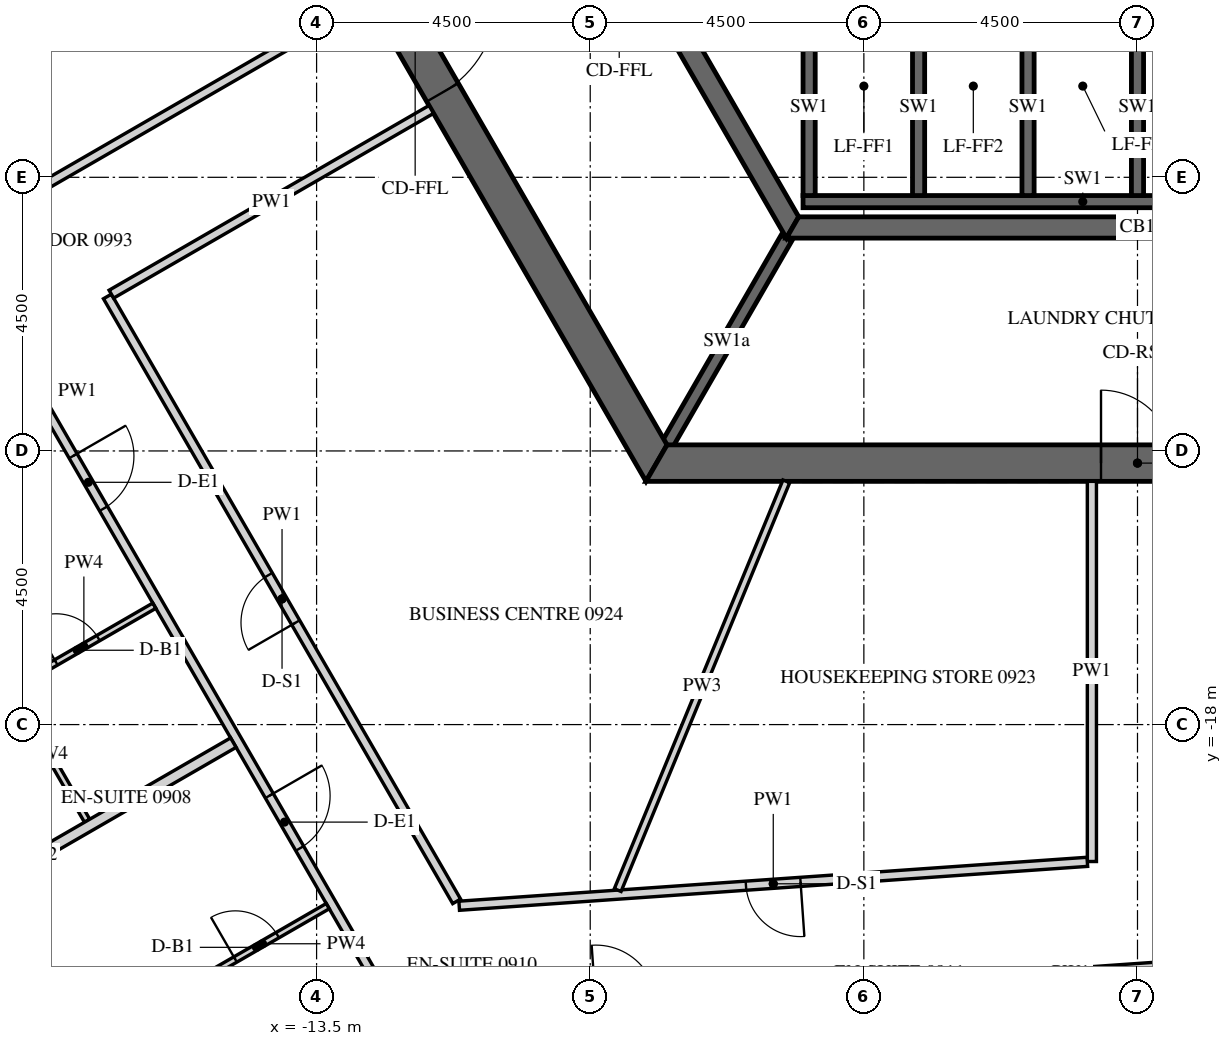
"""IFC4 building model, lengths in metres.
Left out: names, types, materials, properties, quantities, classifications, styles, units other than length and angle.
Written with IfcOpenShell. Run it as: python <this file> out.ifc"""

import sys

from ifc_helpers import new_model, si_unit, direction, frame, frame_2d, origin, place, context, subcontext, project, spatial, polyline, rectangle, outline, extrude, element, fill, save


model = new_model("IFC4")
c1 = context("Model", 3, precision=1e-05, world=origin(), true_north=direction((0.0, 1.0)))
c2 = subcontext(c1, "Body", "Model", "MODEL_VIEW")
j1 = project(units=[si_unit("LENGTHUNIT", "METRE"), si_unit("PLANEANGLEUNIT", "RADIAN")], contexts=[c1])
p1 = place(None, origin())
s1 = spatial("IfcSite", under=j1, at=p1, CompositionType="ELEMENT")
p2 = place(p1, origin())
s2 = spatial("IfcBuilding", under=s1, at=p2, CompositionType="ELEMENT")
p3 = place(p2, frame((0.0, 0.0, 123.3)))
s3 = spatial("IfcBuildingStorey", under=s2, at=p3, CompositionType="ELEMENT", Elevation=123.3)
p4 = place(p3, frame((-32.655, -2.89, -0.15), z_axis=(0.0, 0.0, 1.0), x_axis=(0.499997711317, -0.866026725152, 0.0)))
e1 = element("IfcWall", 1, at=p4, inside=s3, PredefinedType="SOLIDWALL", context=c2, shape_type="SweptSolid", body=[
    extrude(outline(polyline([(-0.022, -0.275), (30.097, -0.275), (30.045, 0.275), (0.022, 0.275), (-0.022, -0.275)])), origin(), (0.0, 0.0, 1.0), 3.9),
])
p5 = place(p4, frame((1.236, 0.0, 1.05)))
e2 = element("IfcOpeningElement", 2, at=p5, cuts=e1, PredefinedType="OPENING", context=c2, shape_type="SweptSolid", body=[
    extrude(rectangle(XDim=2.4, YDim=2.4, at=frame_2d((1.2, 1.2))), frame((0.0, 0.285, 0.0), z_axis=(0.0, -1.0, 0.0), x_axis=(1.0, 0.0, 0.0)), (0.0, 0.0, 1.0), 0.57),
])
p6 = place(p4, frame((4.835, 0.0, 1.05)))
e3 = element("IfcOpeningElement", 3, at=p6, cuts=e1, PredefinedType="OPENING", context=c2, shape_type="SweptSolid", body=[
    extrude(rectangle(XDim=2.4, YDim=2.4, at=frame_2d((1.2, 1.2))), frame((0.0, 0.285, 0.0), z_axis=(0.0, -1.0, 0.0), x_axis=(1.0, 0.0, 0.0)), (0.0, 0.0, 1.0), 0.57),
])
p7 = place(p4, frame((8.436, 0.0, 1.05)))
e4 = element("IfcOpeningElement", 4, at=p7, cuts=e1, PredefinedType="OPENING", context=c2, shape_type="SweptSolid", body=[
    extrude(rectangle(XDim=2.4, YDim=2.4, at=frame_2d((1.2, 1.2))), frame((0.0, 0.285, 0.0), z_axis=(0.0, -1.0, 0.0), x_axis=(1.0, 0.0, 0.0)), (0.0, 0.0, 1.0), 0.57),
])
p8 = place(p4, frame((12.035, 0.0, 1.05)))
e5 = element("IfcOpeningElement", 5, at=p8, cuts=e1, PredefinedType="OPENING", context=c2, shape_type="SweptSolid", body=[
    extrude(rectangle(XDim=2.4, YDim=2.4, at=frame_2d((1.2, 1.2))), frame((0.0, 0.285, 0.0), z_axis=(0.0, -1.0, 0.0), x_axis=(1.0, 0.0, 0.0)), (0.0, 0.0, 1.0), 0.57),
])
p9 = place(p4, frame((15.635, 0.0, 1.05)))
e6 = element("IfcOpeningElement", 6, at=p9, cuts=e1, PredefinedType="OPENING", context=c2, shape_type="SweptSolid", body=[
    extrude(rectangle(XDim=2.4, YDim=2.4, at=frame_2d((1.2, 1.2))), frame((0.0, 0.285, 0.0), z_axis=(0.0, -1.0, 0.0), x_axis=(1.0, 0.0, 0.0)), (0.0, 0.0, 1.0), 0.57),
])
p10 = place(p4, frame((19.236, 0.0, 1.05)))
e7 = element("IfcOpeningElement", 7, at=p10, cuts=e1, PredefinedType="OPENING", context=c2, shape_type="SweptSolid", body=[
    extrude(rectangle(XDim=2.4, YDim=2.4, at=frame_2d((1.2, 1.2))), frame((0.0, 0.285, 0.0), z_axis=(0.0, -1.0, 0.0), x_axis=(1.0, 0.0, 0.0)), (0.0, 0.0, 1.0), 0.57),
])
p11 = place(p4, frame((22.835, 0.0, 1.05)))
e8 = element("IfcOpeningElement", 8, at=p11, cuts=e1, PredefinedType="OPENING", context=c2, shape_type="SweptSolid", body=[
    extrude(rectangle(XDim=2.4, YDim=2.4, at=frame_2d((1.2, 1.2))), frame((0.0, 0.285, 0.0), z_axis=(0.0, -1.0, 0.0), x_axis=(1.0, 0.0, 0.0)), (0.0, 0.0, 1.0), 0.57),
])
p12 = place(p4, frame((26.436, 0.0, 1.05)))
e9 = element("IfcOpeningElement", 9, at=p12, cuts=e1, PredefinedType="OPENING", context=c2, shape_type="SweptSolid", body=[
    extrude(rectangle(XDim=2.4, YDim=2.4, at=frame_2d((1.2, 1.2))), frame((0.0, 0.285, 0.0), z_axis=(0.0, -1.0, 0.0), x_axis=(1.0, 0.0, 0.0)), (0.0, 0.0, 1.0), 0.57),
])
p13 = place(p3, frame((-15.819, 0.0, -0.15), z_axis=(0.0, 0.0, 1.0), x_axis=(0.499999880136, -0.866025472988, 0.0)))
e10 = element("IfcWall", 10, at=p13, inside=s3, PredefinedType="SHEAR", context=c2, shape_type="SweptSolid", body=[
    extrude(outline(polyline([(-0.173, -0.3), (15.993, -0.3), (15.646, 0.3), (0.173, 0.3), (-0.173, -0.3)])), origin(), (0.0, 0.0, 1.0), 3.9),
])
p14 = place(p13, frame((6.981, 0.0, 0.15)))
e11 = element("IfcOpeningElement", 11, at=p14, cuts=e10, PredefinedType="OPENING", context=c2, shape_type="SweptSolid", body=[
    extrude(rectangle(XDim=1.8, YDim=2.4, at=frame_2d((0.9, 1.2))), frame((0.0, 0.31, 0.0), z_axis=(0.0, -1.0, 0.0), x_axis=(1.0, 0.0, 0.0)), (0.0, 0.0, 1.0), 0.62),
])
p15 = place(p3, frame((-7.91, -13.7, -0.15), z_axis=(0.0, 0.0, 1.0), x_axis=(1.0, 0.0, 0.0)))
e12 = element("IfcWall", 12, at=p15, inside=s3, PredefinedType="SHEAR", context=c2, shape_type="SweptSolid", body=[
    extrude(outline(polyline([(-0.173, -0.3), (15.993, -0.3), (15.646, 0.3), (0.173, 0.3), (-0.173, -0.3)])), origin(), (0.0, 0.0, 1.0), 3.9),
])
p16 = place(p15, frame((7.31, 0.0, 0.15)))
e13 = element("IfcOpeningElement", 13, at=p16, cuts=e12, PredefinedType="OPENING", context=c2, shape_type="SweptSolid", body=[
    extrude(rectangle(XDim=1.2, YDim=2.4, at=frame_2d((0.6, 1.2))), frame((0.0, 0.31, 0.0), z_axis=(0.0, -1.0, 0.0), x_axis=(1.0, 0.0, 0.0)), (0.0, 0.0, 1.0), 0.62),
])
p17 = place(p3, frame((-11.345, 0.0, -0.15), z_axis=(0.0, 0.0, 1.0), x_axis=(0.499995046907, -0.866028263435, 0.0)))
e14 = element("IfcWall", 14, at=p17, inside=s3, PredefinedType="SHEAR", context=c2, shape_type="SweptSolid", body=[
    extrude(outline(polyline([(-0.101, -0.175), (11.446, -0.175), (11.244, 0.175), (0.101, 0.175), (-0.101, -0.175)])), origin(), (0.0, 0.0, 1.0), 3.9),
])
p18 = place(p17, frame((4.744, 0.0, 0.15)))
e15 = element("IfcOpeningElement", 15, at=p18, cuts=e14, PredefinedType="OPENING", context=c2, shape_type="SweptSolid", body=[
    extrude(rectangle(XDim=1.8, YDim=2.4, at=frame_2d((0.9, 1.2))), frame((0.0, 0.185, 0.0), z_axis=(0.0, -1.0, 0.0), x_axis=(1.0, 0.0, 0.0)), (0.0, 0.0, 1.0), 0.37),
])
p19 = place(p3, frame((-5.673, -9.825, -0.15), z_axis=(0.0, 0.0, 1.0), x_axis=(1.0, 0.0, 0.0)))
e16 = element("IfcWall", 16, at=p19, inside=s3, PredefinedType="SHEAR", context=c2, shape_type="SweptSolid", body=[
    extrude(outline(polyline([(-0.101, -0.175), (11.446, -0.175), (11.244, 0.175), (0.101, 0.175), (-0.101, -0.175)])), origin(), (0.0, 0.0, 1.0), 3.9),
])
p20 = place(p3, frame((-5.5, -9.4, -0.25), z_axis=(0.0, 0.0, 1.0), x_axis=(1.0, 0.0, 0.0)))
e17 = element("IfcWall", 17, at=p20, inside=s3, PredefinedType="SHEAR", context=c2, shape_type="SweptSolid", body=[
    extrude(rectangle(XDim=9.2, YDim=0.2, at=frame_2d((4.6, 0.0))), origin(), (0.0, 0.0, 1.0), 3.9),
])
for number, where, z_axis, x_axis in (
    (18, (-5.4, -9.3, -0.25), (0.0, 0.0, 1.0), (0.0, 1.0, 0.0)),
    (19, (-3.6, -9.3, -0.25), (0.0, 0.0, 1.0), (0.0, 1.0, 0.0)),
    (20, (-1.8, -9.3, -0.25), (0.0, 0.0, 1.0), (0.0, 1.0, 0.0)),
    (21, (0.0, -9.3, -0.25), (0.0, 0.0, 1.0), (0.0, 1.0, 0.0)),
):
    element("IfcWall", number, at=place(p3, frame(where, z_axis=z_axis, x_axis=x_axis)), inside=s3, PredefinedType="SHEAR", context=c2, shape_type="SweptSolid", body=[
        extrude(rectangle(XDim=2.9, YDim=0.2, at=frame_2d((1.45, 0.0))), origin(), (0.0, 0.0, 1.0), 3.9),
    ])
p21 = place(p3, frame((-5.773, -10.0, -0.15), z_axis=(0.0, 0.0, 1.0), x_axis=(-0.500038251005, -0.86600331843, 0.0)))
e22 = element("IfcWall", 22, at=p21, inside=s3, PredefinedType="SHEAR", context=c2, shape_type="SweptSolid", body=[
    extrude(rectangle(XDim=3.926, YDim=0.2, at=frame_2d((1.963, 0.0))), origin(), (0.0, 0.0, 1.0), 3.9),
])
p22 = place(p3, frame((-24.09, -2.175, 0.0), z_axis=(0.0, 0.0, 1.0), x_axis=(0.499996832073, -0.86602723278, 0.0)))
e23 = element("IfcWall", 23, at=p22, inside=s3, PredefinedType="PARTITIONING", context=c2, shape_type="SweptSolid", body=[
    extrude(rectangle(XDim=23.877, YDim=0.15, at=frame_2d((11.938, 0.0))), origin(), (0.0, 0.0, 1.0), 2.988),
])
p23 = place(p22, frame((6.343, 0.0, 0.0)))
e24 = element("IfcOpeningElement", 24, at=p23, cuts=e23, PredefinedType="OPENING", context=c2, shape_type="SweptSolid", body=[
    extrude(rectangle(XDim=1.0, YDim=2.1, at=frame_2d((0.5, 1.05))), frame((0.0, 0.085, 0.0), z_axis=(0.0, -1.0, 0.0), x_axis=(1.0, 0.0, 0.0)), (0.0, 0.0, 1.0), 0.17),
])
p24 = place(p22, frame((13.172, 0.0, 0.0)))
e25 = element("IfcOpeningElement", 25, at=p24, cuts=e23, PredefinedType="OPENING", context=c2, shape_type="SweptSolid", body=[
    extrude(rectangle(XDim=1.0, YDim=2.1, at=frame_2d((0.5, 1.05))), frame((0.0, 0.085, 0.0), z_axis=(0.0, -1.0, 0.0), x_axis=(1.0, 0.0, 0.0)), (0.0, 0.0, 1.0), 0.17),
])
p25 = place(p22, frame((19.625, 0.0, 0.0)))
e26 = element("IfcOpeningElement", 26, at=p25, cuts=e23, PredefinedType="OPENING", context=c2, shape_type="SweptSolid", body=[
    extrude(rectangle(XDim=1.0, YDim=2.1, at=frame_2d((0.5, 1.05))), frame((0.0, 0.085, 0.0), z_axis=(0.0, -1.0, 0.0), x_axis=(1.0, 0.0, 0.0)), (0.0, 0.0, 1.0), 0.17),
])
p26 = place(p3, frame((-12.068, -22.847, 0.0), z_axis=(0.0, 0.0, 1.0), x_axis=(0.99756437486, 0.069751831595, 0.0)))
e27 = element("IfcWall", 27, at=p26, inside=s3, PredefinedType="PARTITIONING", context=c2, shape_type="SweptSolid", body=[
    extrude(rectangle(XDim=22.002, YDim=0.15, at=frame_2d((11.001, 0.0))), origin(), (0.0, 0.0, 1.0), 2.988),
])
p27 = place(p26, frame((3.169, 0.0, 0.0)))
e28 = element("IfcOpeningElement", 28, at=p27, cuts=e27, PredefinedType="OPENING", context=c2, shape_type="SweptSolid", body=[
    extrude(rectangle(XDim=1.0, YDim=2.1, at=frame_2d((0.5, 1.05))), frame((0.0, 0.085, 0.0), z_axis=(0.0, -1.0, 0.0), x_axis=(1.0, 0.0, 0.0)), (0.0, 0.0, 1.0), 0.17),
])
p28 = place(p26, frame((13.121, 0.0, 0.0)))
e29 = element("IfcOpeningElement", 29, at=p28, cuts=e27, PredefinedType="OPENING", context=c2, shape_type="SweptSolid", body=[
    extrude(rectangle(XDim=1.0, YDim=2.1, at=frame_2d((0.5, 1.05))), frame((0.0, 0.085, 0.0), z_axis=(0.0, -1.0, 0.0), x_axis=(1.0, 0.0, 0.0)), (0.0, 0.0, 1.0), 0.17),
])
p29 = place(p26, frame((20.852, 0.0, 0.0)))
e30 = element("IfcOpeningElement", 30, at=p29, cuts=e27, PredefinedType="OPENING", context=c2, shape_type="SweptSolid", body=[
    extrude(rectangle(XDim=1.0, YDim=2.1, at=frame_2d((0.5, 1.05))), frame((0.0, 0.085, 0.0), z_axis=(0.0, -1.0, 0.0), x_axis=(1.0, 0.0, 0.0)), (0.0, 0.0, 1.0), 0.17),
])
p30 = place(p3, frame((-12.664, -6.066, 0.0), z_axis=(0.0, 0.0, 1.0), x_axis=(-0.866023618125, -0.500003092839, 0.0)))
e31 = element("IfcWall", 31, at=p30, inside=s3, PredefinedType="PARTITIONING", context=c2, shape_type="SweptSolid", body=[
    extrude(rectangle(XDim=6.15, YDim=0.15, at=frame_2d((3.075, 0.0))), origin(), (0.0, 0.0, 1.0), 2.988),
])
p31 = place(p3, frame((-0.75, -14.0, 0.0), z_axis=(0.0, 0.0, 1.0), x_axis=(0.0, -1.0, 0.0)))
e32 = element("IfcWall", 32, at=p31, inside=s3, PredefinedType="PARTITIONING", context=c2, shape_type="SweptSolid", body=[
    extrude(rectangle(XDim=6.252, YDim=0.15, at=frame_2d((3.126, 0.0))), origin(), (0.0, 0.0, 1.0), 2.988),
])
p32 = place(p3, frame((-0.825, -20.257, 0.0), z_axis=(0.0, 0.0, 1.0), x_axis=(-0.9975635143, -0.069764137903, 0.0)))
e33 = element("IfcWall", 33, at=p32, inside=s3, PredefinedType="PARTITIONING", context=c2, shape_type="SweptSolid", body=[
    extrude(rectangle(XDim=10.355, YDim=0.15, at=frame_2d((5.177, 0.0))), origin(), (0.0, 0.0, 1.0), 2.988),
])
p33 = place(p32, frame((4.728, 0.0, 0.0)))
e34 = element("IfcOpeningElement", 34, at=p33, cuts=e33, PredefinedType="OPENING", context=c2, shape_type="SweptSolid", body=[
    extrude(rectangle(XDim=0.9, YDim=2.1, at=frame_2d((0.45, 1.05))), frame((0.0, 0.085, 0.0), z_axis=(0.0, -1.0, 0.0), x_axis=(1.0, 0.0, 0.0)), (0.0, 0.0, 1.0), 0.17),
])
p34 = place(p3, frame((-11.197, -20.907, 0.0), z_axis=(0.0, 0.0, 1.0), x_axis=(-0.500004557924, 0.86602277225, 0.0)))
e35 = element("IfcWall", 35, at=p34, inside=s3, PredefinedType="PARTITIONING", context=c2, shape_type="SweptSolid", body=[
    extrude(rectangle(XDim=11.487, YDim=0.15, at=frame_2d((5.743, 0.0))), origin(), (0.0, 0.0, 1.0), 2.988),
])
p35 = place(p34, frame((5.293, 0.0, 0.0)))
e36 = element("IfcOpeningElement", 36, at=p35, cuts=e35, PredefinedType="OPENING", context=c2, shape_type="SweptSolid", body=[
    extrude(rectangle(XDim=0.9, YDim=2.1, at=frame_2d((0.45, 1.05))), frame((0.0, 0.085, 0.0), z_axis=(0.0, -1.0, 0.0), x_axis=(1.0, 0.0, 0.0)), (0.0, 0.0, 1.0), 0.17),
])
p36 = place(p3, frame((-16.875, -10.922, 0.0), z_axis=(0.0, 0.0, 1.0), x_axis=(0.866023634079, 0.500003065207, 0.0)))
e37 = element("IfcWall", 37, at=p36, inside=s3, PredefinedType="PARTITIONING", context=c2, shape_type="SweptSolid", body=[
    extrude(rectangle(XDim=6.075, YDim=0.15, at=frame_2d((3.038, 0.0))), origin(), (0.0, 0.0, 1.0), 2.988),
])
p37 = place(p3, frame((-17.274, -19.581, 0.0), z_axis=(0.0, 0.0, 1.0), x_axis=(-0.499946979623, 0.86605601295, 0.0)))
e38 = element("IfcWall", 38, at=p37, inside=s3, PredefinedType="PARTITIONING", context=c2, shape_type="SweptSolid", body=[
    extrude(rectangle(XDim=2.51, YDim=0.1, at=frame_2d((1.255, 0.0))), origin(), (0.0, 0.0, 1.0), 2.988),
])
p38 = place(p3, frame((-18.485, -17.383, 0.0), z_axis=(0.0, 0.0, 1.0), x_axis=(0.866004723184, 0.50003581814, 0.0)))
e39 = element("IfcWall", 39, at=p38, inside=s3, PredefinedType="PARTITIONING", context=c2, shape_type="SweptSolid", body=[
    extrude(rectangle(XDim=2.675, YDim=0.1, at=frame_2d((1.337, 0.0))), origin(), (0.0, 0.0, 1.0), 2.988),
])
p39 = place(p38, frame((0.81, 0.0, 0.0)))
e40 = element("IfcOpeningElement", 40, at=p39, cuts=e39, PredefinedType="OPENING", context=c2, shape_type="SweptSolid", body=[
    extrude(rectangle(XDim=0.8, YDim=2.1, at=frame_2d((0.4, 1.05))), frame((0.0, 0.06, 0.0), z_axis=(0.0, -1.0, 0.0), x_axis=(1.0, 0.0, 0.0)), (0.0, 0.0, 1.0), 0.12),
])
p40 = place(p3, frame((-21.299, -22.009, 0.0), z_axis=(0.0, 0.0, 1.0), x_axis=(0.866014745021, 0.500018461065, 0.0)))
e41 = element("IfcWall", 41, at=p40, inside=s3, PredefinedType="PARTITIONING", context=c2, shape_type="SweptSolid", body=[
    extrude(rectangle(XDim=7.425, YDim=0.18, at=frame_2d((3.712, 0.0))), origin(), (0.0, 0.0, 1.0), 2.988),
])
p41 = place(p3, frame((-15.46, -22.223, 0.0), z_axis=(0.0, 0.0, 1.0), x_axis=(0.866031185235, 0.4999899861, 0.0)))
e42 = element("IfcWall", 42, at=p41, inside=s3, PredefinedType="PARTITIONING", context=c2, shape_type="SweptSolid", body=[
    extrude(rectangle(XDim=2.475, YDim=0.1, at=frame_2d((1.238, 0.0))), origin(), (0.0, 0.0, 1.0), 2.988),
])
p42 = place(p41, frame((0.72, 0.0, 0.0)))
e43 = element("IfcOpeningElement", 43, at=p42, cuts=e42, PredefinedType="OPENING", context=c2, shape_type="SweptSolid", body=[
    extrude(rectangle(XDim=0.8, YDim=2.1, at=frame_2d((0.4, 1.05))), frame((0.0, 0.06, 0.0), z_axis=(0.0, -1.0, 0.0), x_axis=(1.0, 0.0, 0.0)), (0.0, 0.0, 1.0), 0.12),
])
p43 = place(p3, frame((-5.775, -14.0, 0.0), z_axis=(0.0, 0.0, 1.0), x_axis=(-0.381361051417, -0.924426172532, 0.0)))
e44 = element("IfcWall", 44, at=p43, inside=s3, PredefinedType="PARTITIONING", context=c2, shape_type="SweptSolid", body=[
    extrude(rectangle(XDim=7.271, YDim=0.12, at=frame_2d((3.636, 0.0))), origin(), (0.0, 0.0, 1.0), 2.988),
])
p44 = place(p14, origin())
e45 = element("IfcDoor", 45, at=p44, inside=s3, OperationType="DOUBLE_DOOR_SINGLE_SWING", PredefinedType="DOOR", context=c2, shape_type="SweptSolid", body=[
    extrude(rectangle(XDim=1.8, YDim=2.4, at=frame_2d((0.9, 1.2))), frame((0.0, 0.025, 0.0), z_axis=(0.0, -1.0, 0.0), x_axis=(1.0, 0.0, 0.0)), (0.0, 0.0, 1.0), 0.05),
])
fill(e11, e45)
p45 = place(p16, origin())
e46 = element("IfcDoor", 46, at=p45, inside=s3, OperationType="SINGLE_SWING_LEFT", PredefinedType="DOOR", context=c2, shape_type="SweptSolid", body=[
    extrude(rectangle(XDim=1.2, YDim=2.4, at=frame_2d((0.6, 1.2))), frame((0.0, 0.025, 0.0), z_axis=(0.0, -1.0, 0.0), x_axis=(1.0, 0.0, 0.0)), (0.0, 0.0, 1.0), 0.05),
])
fill(e13, e46)
p46 = place(p24, origin())
e47 = element("IfcDoor", 47, at=p46, inside=s3, OperationType="SINGLE_SWING_LEFT", PredefinedType="DOOR", context=c2, shape_type="SweptSolid", body=[
    extrude(rectangle(XDim=1.0, YDim=2.1, at=frame_2d((0.5, 1.05))), frame((0.0, 0.025, 0.0), z_axis=(0.0, -1.0, 0.0), x_axis=(1.0, 0.0, 0.0)), (0.0, 0.0, 1.0), 0.05),
])
fill(e25, e47)
p47 = place(p39, origin())
e48 = element("IfcDoor", 48, at=p47, inside=s3, OperationType="SINGLE_SWING_RIGHT", PredefinedType="DOOR", context=c2, shape_type="SweptSolid", body=[
    extrude(rectangle(XDim=0.8, YDim=2.1, at=frame_2d((0.4, 1.05))), frame((0.0, 0.025, 0.0), z_axis=(0.0, -1.0, 0.0), x_axis=(1.0, 0.0, 0.0)), (0.0, 0.0, 1.0), 0.05),
])
fill(e40, e48)
p48 = place(p25, origin())
e49 = element("IfcDoor", 49, at=p48, inside=s3, OperationType="SINGLE_SWING_RIGHT", PredefinedType="DOOR", context=c2, shape_type="SweptSolid", body=[
    extrude(rectangle(XDim=1.0, YDim=2.1, at=frame_2d((0.5, 1.05))), frame((0.0, 0.025, 0.0), z_axis=(0.0, -1.0, 0.0), x_axis=(1.0, 0.0, 0.0)), (0.0, 0.0, 1.0), 0.05),
])
fill(e26, e49)
p49 = place(p42, origin())
e50 = element("IfcDoor", 50, at=p49, inside=s3, OperationType="SINGLE_SWING_RIGHT", PredefinedType="DOOR", context=c2, shape_type="SweptSolid", body=[
    extrude(rectangle(XDim=0.8, YDim=2.1, at=frame_2d((0.4, 1.05))), frame((0.0, 0.025, 0.0), z_axis=(0.0, -1.0, 0.0), x_axis=(1.0, 0.0, 0.0)), (0.0, 0.0, 1.0), 0.05),
])
fill(e43, e50)
p50 = place(p33, origin())
e51 = element("IfcDoor", 51, at=p50, inside=s3, OperationType="SINGLE_SWING_LEFT", PredefinedType="DOOR", context=c2, shape_type="SweptSolid", body=[
    extrude(rectangle(XDim=0.9, YDim=2.1, at=frame_2d((0.45, 1.05))), frame((0.0, 0.025, 0.0), z_axis=(0.0, -1.0, 0.0), x_axis=(1.0, 0.0, 0.0)), (0.0, 0.0, 1.0), 0.05),
])
fill(e34, e51)
p51 = place(p35, origin())
e52 = element("IfcDoor", 52, at=p51, inside=s3, OperationType="SINGLE_SWING_RIGHT", PredefinedType="DOOR", context=c2, shape_type="SweptSolid", body=[
    extrude(rectangle(XDim=0.9, YDim=2.1, at=frame_2d((0.45, 1.05))), frame((0.0, 0.025, 0.0), z_axis=(0.0, -1.0, 0.0), x_axis=(1.0, 0.0, 0.0)), (0.0, 0.0, 1.0), 0.05),
])
fill(e36, e52)
save(model, sys.argv[1])
